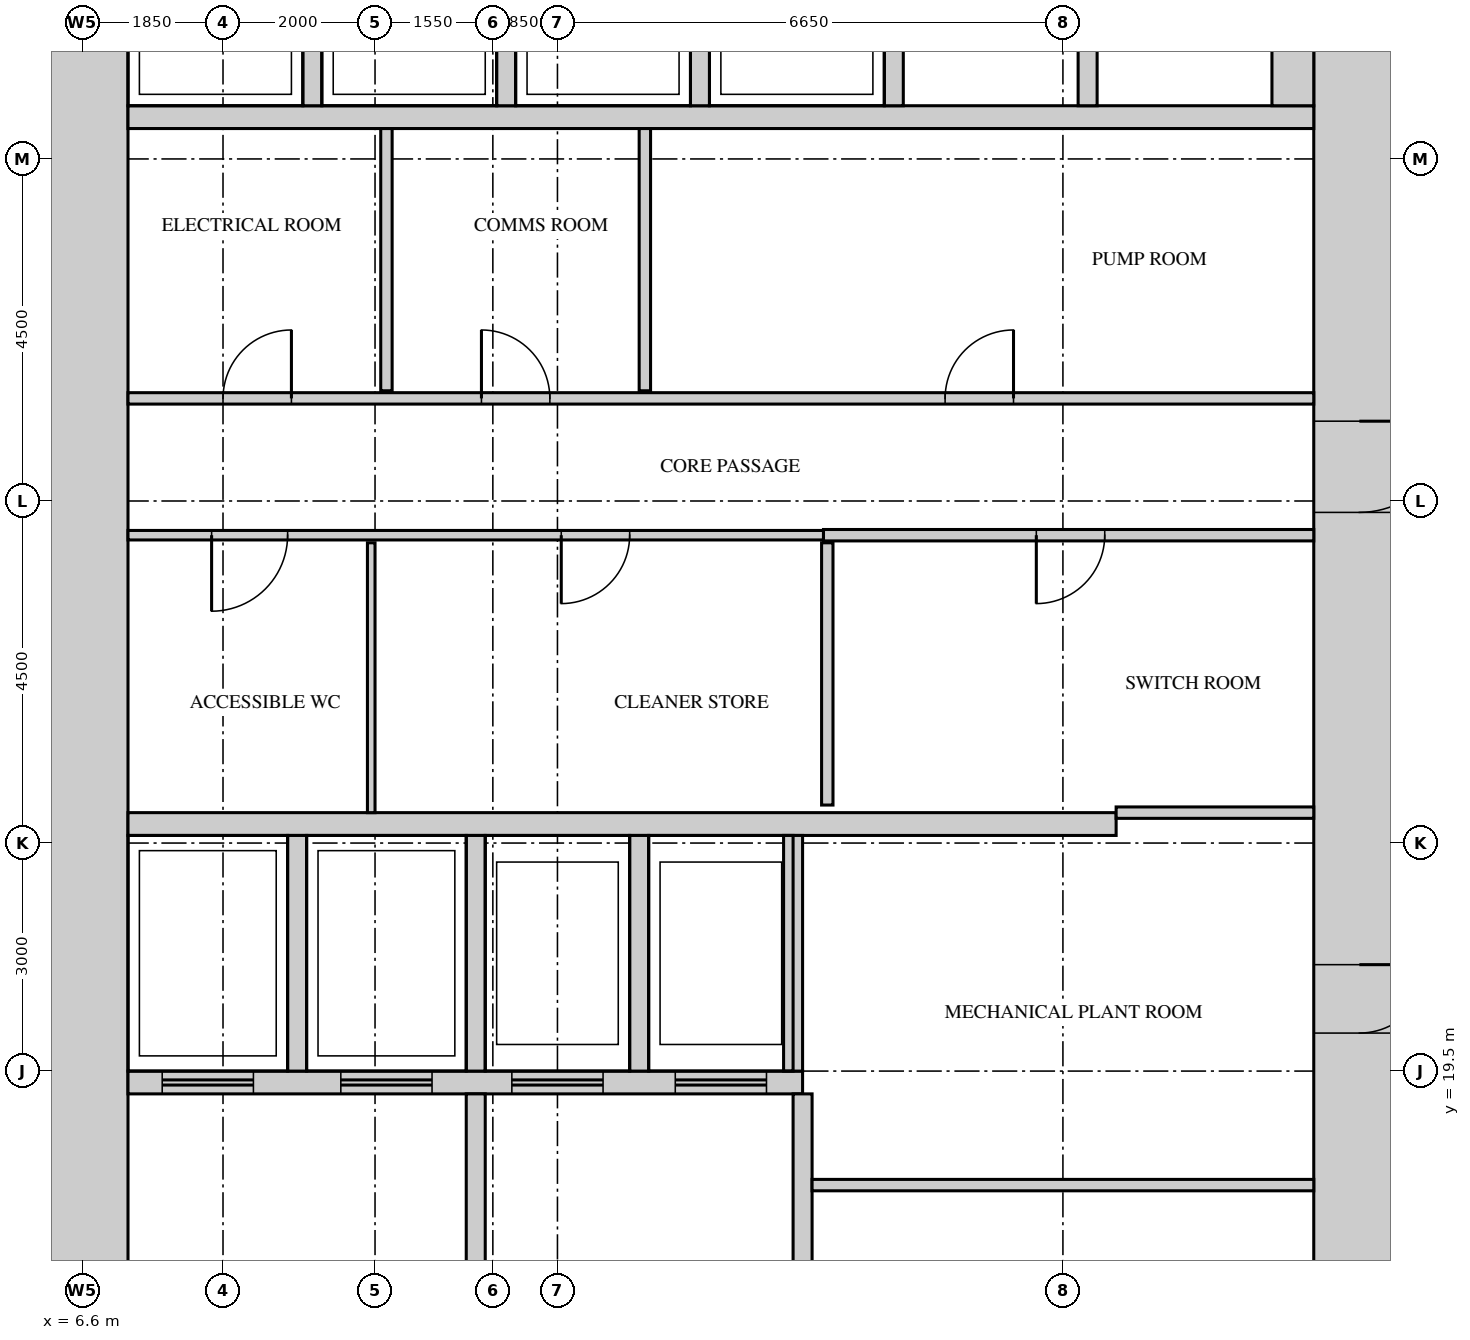
"""IFC4 building model, lengths in metres.
Left out: names, types, materials, properties, quantities, classifications, styles, units other than length and angle.
Written with IfcOpenShell. Run it as: python <this file> out.ifc"""

import sys

from ifc_helpers import new_model, si_unit, direction, frame, frame_2d, origin, place, context, subcontext, project, spatial, rectangle, extrude, source, transform, mapped, element, fill, save


model = new_model("IFC4")
c1 = context("Model", 3, precision=1e-05, world=origin(), true_north=direction((0.0, 1.0)))
c2 = subcontext(c1, "Body", "Model", "MODEL_VIEW")
j1 = project(units=[si_unit("LENGTHUNIT", "METRE"), si_unit("PLANEANGLEUNIT", "RADIAN")], contexts=[c1])
p1 = place(None, origin())
s1 = spatial("IfcSite", under=j1, at=p1, CompositionType="ELEMENT")
p2 = place(p1, origin())
s2 = spatial("IfcBuilding", under=s1, at=p2, CompositionType="ELEMENT")
p3 = place(p2, frame((0.0, 0.0, 37.5)))
s3 = spatial("IfcBuildingStorey", under=s2, at=p3, CompositionType="ELEMENT", Elevation=37.5)
m1 = source(origin(), c2, "Body", "SweptSolid", [
    extrude(rectangle(XDim=27.6, YDim=1.2, at=frame_2d((13.8, 0.0))), origin(), (0.0, 0.0, 1.0), 4.2),
])
p4 = place(p3, frame((23.4, 13.2, 0.0), z_axis=(0.0, 0.0, 1.0), x_axis=(0.0, 1.0, 0.0)))
e1 = element("IfcWall", 1, at=p4, inside=s3, PredefinedType="SHEAR", context=c2, shape_type="MappedRepresentation", body=[
    mapped(m1, transform((0.0, 0.0, 0.0))),
])
m2 = source(origin(), c2, "Body", "SweptSolid", [
    extrude(rectangle(XDim=1.8, YDim=2.1, at=frame_2d((0.9, 1.05))), frame((0.0, 0.61, 0.0), z_axis=(0.0, -1.0, 0.0), x_axis=(1.0, 0.0, 0.0)), (0.0, 0.0, 1.0), 1.22),
])
p5 = place(p4, frame((22.4, 0.0, 0.0)))
e2 = element("IfcOpeningElement", 2, at=p5, cuts=e1, PredefinedType="OPENING", context=c2, shape_type="MappedRepresentation", body=[
    mapped(m2, transform((0.0, 0.0, 0.0))),
])
m3 = source(origin(), c2, "Body", "SweptSolid", [
    extrude(rectangle(XDim=1.2, YDim=2.1, at=frame_2d((0.6, 1.05))), frame((0.0, 0.61, 0.0), z_axis=(0.0, -1.0, 0.0), x_axis=(1.0, 0.0, 0.0)), (0.0, 0.0, 1.0), 1.22),
])
p6 = place(p4, frame((13.65, 0.0, 0.0)))
e3 = element("IfcOpeningElement", 3, at=p6, cuts=e1, PredefinedType="OPENING", context=c2, shape_type="MappedRepresentation", body=[
    mapped(m3, transform((0.0, 0.0, 0.0))),
])
m4 = source(origin(), c2, "Body", "SweptSolid", [
    extrude(rectangle(XDim=0.9, YDim=2.1, at=frame_2d((0.45, 1.05))), frame((0.0, 0.61, 0.0), z_axis=(0.0, -1.0, 0.0), x_axis=(1.0, 0.0, 0.0)), (0.0, 0.0, 1.0), 1.22),
])
p7 = place(p4, frame((1.95, 0.0, 0.0)))
e4 = element("IfcOpeningElement", 4, at=p7, cuts=e1, PredefinedType="OPENING", context=c2, shape_type="MappedRepresentation", body=[
    mapped(m4, transform((0.0, 0.0, 0.0))),
])
p8 = place(p4, frame((6.8, 0.0, 0.0)))
e5 = element("IfcOpeningElement", 5, at=p8, cuts=e1, PredefinedType="OPENING", context=c2, shape_type="MappedRepresentation", body=[
    mapped(m4, transform((0.0, 0.0, 0.0))),
])
p9 = place(p3, frame((6.6, 13.2, 0.0), z_axis=(0.0, 0.0, 1.0), x_axis=(0.0, 1.0, 0.0)))
e6 = element("IfcWall", 6, at=p9, inside=s3, PredefinedType="SHEAR", context=c2, shape_type="MappedRepresentation", body=[
    mapped(m1, transform((0.0, 0.0, 0.0))),
])
m5 = source(origin(), c2, "Body", "SweptSolid", [
    extrude(rectangle(XDim=13.0, YDim=0.3, at=frame_2d((6.5, 0.0))), origin(), (0.0, 0.0, 1.0), 4.2),
])
p10 = place(p3, frame((7.2, 22.75, 0.0), z_axis=(0.0, 0.0, 1.0), x_axis=(1.0, 0.0, 0.0)))
e7 = element("IfcWall", 7, at=p10, inside=s3, PredefinedType="STANDARD", context=c2, shape_type="MappedRepresentation", body=[
    mapped(m5, transform((0.0, 0.0, 0.0))),
])
m6 = source(origin(), c2, "Body", "SweptSolid", [
    extrude(rectangle(XDim=8.875, YDim=0.3, at=frame_2d((4.438, 0.0))), origin(), (0.0, 0.0, 1.0), 4.2),
])
p11 = place(p3, frame((7.2, 19.35, 0.0), z_axis=(0.0, 0.0, 1.0), x_axis=(1.0, 0.0, 0.0)))
e8 = element("IfcWall", 8, at=p11, inside=s3, PredefinedType="STANDARD", context=c2, shape_type="MappedRepresentation", body=[
    mapped(m6, transform((0.0, 0.0, 0.0))),
])
m7 = source(origin(), c2, "Body", "SweptSolid", [
    extrude(rectangle(XDim=1.2, YDim=2.1, at=frame_2d((0.6, 1.05))), frame((0.0, 0.16, 0.0), z_axis=(0.0, -1.0, 0.0), x_axis=(1.0, 0.0, 0.0)), (0.0, 0.0, 1.0), 0.32),
])
p12 = place(p11, frame((0.45, 0.0, 0.0)))
e9 = element("IfcOpeningElement", 9, at=p12, cuts=e8, PredefinedType="OPENING", context=c2, shape_type="MappedRepresentation", body=[
    mapped(m7, transform((0.0, 0.0, 0.0))),
])
p13 = place(p11, frame((2.8, 0.0, 0.0)))
e10 = element("IfcOpeningElement", 10, at=p13, cuts=e8, PredefinedType="OPENING", context=c2, shape_type="MappedRepresentation", body=[
    mapped(m7, transform((0.0, 0.0, 0.0))),
])
p14 = place(p11, frame((5.05, 0.0, 0.0)))
e11 = element("IfcOpeningElement", 11, at=p14, cuts=e8, PredefinedType="OPENING", context=c2, shape_type="MappedRepresentation", body=[
    mapped(m7, transform((0.0, 0.0, 0.0))),
])
p15 = place(p11, frame((7.2, 0.0, 0.0)))
e12 = element("IfcOpeningElement", 12, at=p15, cuts=e8, PredefinedType="OPENING", context=c2, shape_type="MappedRepresentation", body=[
    mapped(m7, transform((0.0, 0.0, 0.0))),
])
m8 = source(origin(), c2, "Body", "SweptSolid", [
    extrude(rectangle(XDim=15.6, YDim=0.3, at=frame_2d((7.8, 0.0))), origin(), (0.0, 0.0, 1.0), 4.2),
])
p16 = place(p3, frame((7.2, 32.05, 0.0), z_axis=(0.0, 0.0, 1.0), x_axis=(1.0, 0.0, 0.0)))
e13 = element("IfcWall", 13, at=p16, inside=s3, PredefinedType="STANDARD", context=c2, shape_type="MappedRepresentation", body=[
    mapped(m8, transform((0.0, 0.0, 0.0))),
])
m9 = source(origin(), c2, "Body", "SweptSolid", [
    extrude(rectangle(XDim=3.1, YDim=0.25, at=frame_2d((1.55, 0.0))), origin(), (0.0, 0.0, 1.0), 4.2),
])
for number, where, z_axis, x_axis in (
    (14, (9.425, 19.5, 0.0), (0.0, 0.0, 1.0), (0.0, 1.0, 0.0)),
    (15, (11.775, 19.5, 0.0), (0.0, 0.0, 1.0), (0.0, 1.0, 0.0)),
    (16, (13.925, 19.5, 0.0), (0.0, 0.0, 1.0), (0.0, 1.0, 0.0)),
    (17, (15.95, 19.5, 0.0), (0.0, 0.0, 1.0), (0.0, 1.0, 0.0)),
):
    element("IfcWall", number, at=place(p3, frame(where, z_axis=z_axis, x_axis=x_axis)), inside=s3, PredefinedType="STANDARD", context=c2, shape_type="MappedRepresentation", body=[
        mapped(m9, transform((0.0, 0.0, 0.0))),
    ])
m10 = source(origin(), c2, "Body", "SweptSolid", [
    extrude(rectangle(XDim=2.4, YDim=0.25, at=frame_2d((1.2, 0.0))), origin(), (0.0, 0.0, 1.0), 4.2),
])
for number, where, z_axis, x_axis in (
    (18, (9.625, 32.2, 0.0), (0.0, 0.0, 1.0), (0.0, 1.0, 0.0)),
    (19, (12.175, 32.2, 0.0), (0.0, 0.0, 1.0), (0.0, 1.0, 0.0)),
    (20, (14.725, 32.2, 0.0), (0.0, 0.0, 1.0), (0.0, 1.0, 0.0)),
    (21, (17.275, 32.2, 0.0), (0.0, 0.0, 1.0), (0.0, 1.0, 0.0)),
    (22, (19.825, 32.2, 0.0), (0.0, 0.0, 1.0), (0.0, 1.0, 0.0)),
):
    element("IfcWall", number, at=place(p3, frame(where, z_axis=z_axis, x_axis=x_axis)), inside=s3, PredefinedType="STANDARD", context=c2, shape_type="MappedRepresentation", body=[
        mapped(m10, transform((0.0, 0.0, 0.0))),
    ])
m11 = source(origin(), c2, "Body", "SweptSolid", [
    extrude(rectangle(XDim=2.4, YDim=0.55, at=frame_2d((1.2, 0.0))), origin(), (0.0, 0.0, 1.0), 4.2),
])
p17 = place(p3, frame((22.525, 32.2, 0.0), z_axis=(0.0, 0.0, 1.0), x_axis=(0.0, 1.0, 0.0)))
e23 = element("IfcWall", 23, at=p17, inside=s3, PredefinedType="STANDARD", context=c2, shape_type="MappedRepresentation", body=[
    mapped(m11, transform((0.0, 0.0, 0.0))),
])
m12 = source(origin(), c2, "Body", "SweptSolid", [
    extrude(rectangle(XDim=3.4, YDim=0.25, at=frame_2d((1.7, 0.0))), origin(), (0.0, 0.0, 1.0), 4.2),
])
for number, where, z_axis, x_axis in (
    (24, (16.075, 15.8, 0.0), (0.0, 0.0, 1.0), (0.0, 1.0, 0.0)),
    (25, (11.775, 15.8, 0.0), (0.0, 0.0, 1.0), (0.0, 1.0, 0.0)),
):
    element("IfcWall", number, at=place(p3, frame(where, z_axis=z_axis, x_axis=x_axis)), inside=s3, PredefinedType="STANDARD", context=c2, shape_type="MappedRepresentation", body=[
        mapped(m12, transform((0.0, 0.0, 0.0))),
    ])
m13 = source(origin(), c2, "Body", "SweptSolid", [
    extrude(rectangle(XDim=6.6, YDim=0.15, at=frame_2d((3.3, 0.0))), origin(), (0.0, 0.0, 1.0), 4.3),
])
p18 = place(p3, frame((16.2, 18.0, 0.0), z_axis=(0.0, 0.0, 1.0), x_axis=(1.0, 0.0, 0.0)))
e26 = element("IfcWall", 26, at=p18, inside=s3, PredefinedType="PARTITIONING", context=c2, shape_type="MappedRepresentation", body=[
    mapped(m13, transform((0.0, 0.0, 0.0))),
])
m14 = source(origin(), c2, "Body", "SweptSolid", [
    extrude(rectangle(XDim=3.55, YDim=0.1, at=frame_2d((1.775, 0.0))), origin(), (0.0, 0.0, 1.0), 4.3),
])
p19 = place(p3, frame((10.4, 22.9, 0.0), z_axis=(0.0, 0.0, 1.0), x_axis=(0.0, 1.0, 0.0)))
e27 = element("IfcWall", 27, at=p19, inside=s3, PredefinedType="PARTITIONING", context=c2, shape_type="MappedRepresentation", body=[
    mapped(m14, transform((0.0, 0.0, 0.0))),
])
m15 = source(origin(), c2, "Body", "SweptSolid", [
    extrude(rectangle(XDim=2.6, YDim=0.15, at=frame_2d((1.3, 0.0))), origin(), (0.0, 0.0, 1.0), 4.3),
])
p20 = place(p3, frame((20.2, 22.9, 0.0), z_axis=(0.0, 0.0, 1.0), x_axis=(1.0, 0.0, 0.0)))
e28 = element("IfcWall", 28, at=p20, inside=s3, PredefinedType="PARTITIONING", context=c2, shape_type="MappedRepresentation", body=[
    mapped(m15, transform((0.0, 0.0, 0.0))),
])
m16 = source(origin(), c2, "Body", "SweptSolid", [
    extrude(rectangle(XDim=3.45, YDim=0.15, at=frame_2d((1.725, 0.0))), origin(), (0.0, 0.0, 1.0), 4.3),
])
p21 = place(p3, frame((16.4, 23.0, 0.0), z_axis=(0.0, 0.0, 1.0), x_axis=(0.0, 1.0, 0.0)))
e29 = element("IfcWall", 29, at=p21, inside=s3, PredefinedType="PARTITIONING", context=c2, shape_type="MappedRepresentation", body=[
    mapped(m16, transform((0.0, 0.0, 0.0))),
])
m17 = source(origin(), c2, "Body", "SweptSolid", [
    extrude(rectangle(XDim=9.15, YDim=0.125, at=frame_2d((4.575, 0.0))), origin(), (0.0, 0.0, 1.0), 4.3),
])
p22 = place(p3, frame((7.2, 26.55, 0.0), z_axis=(0.0, 0.0, 1.0), x_axis=(1.0, 0.0, 0.0)))
e30 = element("IfcWall", 30, at=p22, inside=s3, PredefinedType="PARTITIONING", context=c2, shape_type="MappedRepresentation", body=[
    mapped(m17, transform((0.0, 0.0, 0.0))),
])
m18 = source(origin(), c2, "Body", "SweptSolid", [
    extrude(rectangle(XDim=1.0, YDim=2.1, at=frame_2d((0.5, 1.05))), frame((0.0, 0.073, 0.0), z_axis=(0.0, -1.0, 0.0), x_axis=(1.0, 0.0, 0.0)), (0.0, 0.0, 1.0), 0.145),
])
p23 = place(p22, frame((1.1, 0.0, 0.0)))
e31 = element("IfcOpeningElement", 31, at=p23, cuts=e30, PredefinedType="OPENING", context=c2, shape_type="MappedRepresentation", body=[
    mapped(m18, transform((0.0, 0.0, 0.0))),
])
m19 = source(origin(), c2, "Body", "SweptSolid", [
    extrude(rectangle(XDim=0.9, YDim=2.1, at=frame_2d((0.45, 1.05))), frame((0.0, 0.073, 0.0), z_axis=(0.0, -1.0, 0.0), x_axis=(1.0, 0.0, 0.0)), (0.0, 0.0, 1.0), 0.145),
])
p24 = place(p22, frame((5.7, 0.0, 0.0)))
e32 = element("IfcOpeningElement", 32, at=p24, cuts=e30, PredefinedType="OPENING", context=c2, shape_type="MappedRepresentation", body=[
    mapped(m19, transform((0.0, 0.0, 0.0))),
])
m20 = source(origin(), c2, "Body", "SweptSolid", [
    extrude(rectangle(XDim=6.45, YDim=0.15, at=frame_2d((3.225, 0.0))), origin(), (0.0, 0.0, 1.0), 4.3),
])
p25 = place(p3, frame((16.35, 26.55, 0.0), z_axis=(0.0, 0.0, 1.0), x_axis=(1.0, 0.0, 0.0)))
e33 = element("IfcWall", 33, at=p25, inside=s3, PredefinedType="PARTITIONING", context=c2, shape_type="MappedRepresentation", body=[
    mapped(m20, transform((0.0, 0.0, 0.0))),
])
m21 = source(origin(), c2, "Body", "SweptSolid", [
    extrude(rectangle(XDim=0.9, YDim=2.1, at=frame_2d((0.45, 1.05))), frame((0.0, 0.085, 0.0), z_axis=(0.0, -1.0, 0.0), x_axis=(1.0, 0.0, 0.0)), (0.0, 0.0, 1.0), 0.17),
])
p26 = place(p25, frame((2.8, 0.0, 0.0)))
e34 = element("IfcOpeningElement", 34, at=p26, cuts=e33, PredefinedType="OPENING", context=c2, shape_type="MappedRepresentation", body=[
    mapped(m21, transform((0.0, 0.0, 0.0))),
])
m22 = source(origin(), c2, "Body", "SweptSolid", [
    extrude(rectangle(XDim=15.6, YDim=0.15, at=frame_2d((7.8, 0.0))), origin(), (0.0, 0.0, 1.0), 4.3),
])
p27 = place(p3, frame((7.2, 28.35, 0.0), z_axis=(0.0, 0.0, 1.0), x_axis=(1.0, 0.0, 0.0)))
e35 = element("IfcWall", 35, at=p27, inside=s3, PredefinedType="PARTITIONING", context=c2, shape_type="MappedRepresentation", body=[
    mapped(m22, transform((0.0, 0.0, 0.0))),
])
p28 = place(p27, frame((1.25, 0.0, 0.0)))
e36 = element("IfcOpeningElement", 36, at=p28, cuts=e35, PredefinedType="OPENING", context=c2, shape_type="MappedRepresentation", body=[
    mapped(m21, transform((0.0, 0.0, 0.0))),
])
p29 = place(p27, frame((4.65, 0.0, 0.0)))
e37 = element("IfcOpeningElement", 37, at=p29, cuts=e35, PredefinedType="OPENING", context=c2, shape_type="MappedRepresentation", body=[
    mapped(m21, transform((0.0, 0.0, 0.0))),
])
p30 = place(p27, frame((10.75, 0.0, 0.0)))
e38 = element("IfcOpeningElement", 38, at=p30, cuts=e35, PredefinedType="OPENING", context=c2, shape_type="MappedRepresentation", body=[
    mapped(m21, transform((0.0, 0.0, 0.0))),
])
for number, where, z_axis, x_axis in (
    (39, (10.6, 28.45, 0.0), (0.0, 0.0, 1.0), (0.0, 1.0, 0.0)),
    (40, (14.0, 28.45, 0.0), (0.0, 0.0, 1.0), (0.0, 1.0, 0.0)),
):
    element("IfcWall", number, at=place(p3, frame(where, z_axis=z_axis, x_axis=x_axis)), inside=s3, PredefinedType="PARTITIONING", context=c2, shape_type="MappedRepresentation", body=[
        mapped(m16, transform((0.0, 0.0, 0.0))),
    ])
m23 = source(origin(), c2, "Body", "SweptSolid", [
    extrude(rectangle(XDim=1.2, YDim=2.1, at=frame_2d((0.6, 1.05))), frame((0.0, 0.55, 0.0), z_axis=(0.0, -1.0, 0.0), x_axis=(1.0, 0.0, 0.0)), (0.0, 0.0, 1.0), 1.1),
])
p31 = place(p6, origin())
e41 = element("IfcDoor", 41, at=p31, inside=s3, OperationType="SINGLE_SWING_RIGHT", PredefinedType="DOOR", context=c2, shape_type="MappedRepresentation", body=[
    mapped(m23, transform((0.0, 0.0, 0.0))),
])
fill(e3, e41)
m24 = source(origin(), c2, "Body", "SweptSolid", [
    extrude(rectangle(XDim=0.9, YDim=2.1, at=frame_2d((0.45, 1.05))), frame((0.0, 0.025, 0.0), z_axis=(0.0, -1.0, 0.0), x_axis=(1.0, 0.0, 0.0)), (0.0, 0.0, 1.0), 0.05),
])
p32 = place(p28, origin())
e42 = element("IfcDoor", 42, at=p32, inside=s3, OperationType="SINGLE_SWING_LEFT", PredefinedType="DOOR", context=c2, shape_type="MappedRepresentation", body=[
    mapped(m24, transform((0.0, 0.0, 0.0))),
])
fill(e36, e42)
p33 = place(p29, origin())
e43 = element("IfcDoor", 43, at=p33, inside=s3, OperationType="SINGLE_SWING_RIGHT", PredefinedType="DOOR", context=c2, shape_type="MappedRepresentation", body=[
    mapped(m24, transform((0.0, 0.0, 0.0))),
])
fill(e37, e43)
p34 = place(p30, origin())
e44 = element("IfcDoor", 44, at=p34, inside=s3, OperationType="SINGLE_SWING_LEFT", PredefinedType="DOOR", context=c2, shape_type="MappedRepresentation", body=[
    mapped(m24, transform((0.0, 0.0, 0.0))),
])
fill(e38, e44)
m25 = source(origin(), c2, "Body", "SweptSolid", [
    extrude(rectangle(XDim=1.0, YDim=2.1, at=frame_2d((0.5, 1.05))), frame((0.0, 0.025, 0.0), z_axis=(0.0, -1.0, 0.0), x_axis=(1.0, 0.0, 0.0)), (0.0, 0.0, 1.0), 0.05),
])
p35 = place(p23, origin())
e45 = element("IfcDoor", 45, at=p35, inside=s3, OperationType="SINGLE_SWING_LEFT", PredefinedType="DOOR", context=c2, shape_type="MappedRepresentation", body=[
    mapped(m25, transform((0.0, 0.0, 0.0))),
])
fill(e31, e45)
p36 = place(p24, origin())
e46 = element("IfcDoor", 46, at=p36, inside=s3, OperationType="SINGLE_SWING_LEFT", PredefinedType="DOOR", context=c2, shape_type="MappedRepresentation", body=[
    mapped(m24, transform((0.0, 0.0, 0.0))),
])
fill(e32, e46)
p37 = place(p26, origin())
e47 = element("IfcDoor", 47, at=p37, inside=s3, OperationType="SINGLE_SWING_LEFT", PredefinedType="DOOR", context=c2, shape_type="MappedRepresentation", body=[
    mapped(m24, transform((0.0, 0.0, 0.0))),
])
fill(e34, e47)
m26 = source(origin(), c2, "Body", "SweptSolid", [
    extrude(rectangle(XDim=0.9, YDim=2.1, at=frame_2d((0.45, 1.05))), frame((0.0, 0.55, 0.0), z_axis=(0.0, -1.0, 0.0), x_axis=(1.0, 0.0, 0.0)), (0.0, 0.0, 1.0), 1.1),
])
p38 = place(p8, origin())
e48 = element("IfcDoor", 48, at=p38, inside=s3, OperationType="SINGLE_SWING_RIGHT", PredefinedType="DOOR", context=c2, shape_type="MappedRepresentation", body=[
    mapped(m26, transform((0.0, 0.0, 0.0))),
])
fill(e5, e48)
m27 = source(origin(), c2, "Body", "SweptSolid", [
    extrude(rectangle(XDim=1.2, YDim=2.1, at=frame_2d((0.6, 1.05))), frame((0.0, 0.025, 0.0), z_axis=(0.0, -1.0, 0.0), x_axis=(1.0, 0.0, 0.0)), (0.0, 0.0, 1.0), 0.05),
])
p39 = place(p12, origin())
e49 = element("IfcDoor", 49, at=p39, inside=s3, OperationType="DOUBLE_DOOR_SLIDING", PredefinedType="DOOR", context=c2, shape_type="MappedRepresentation", body=[
    mapped(m27, transform((0.0, 0.0, 0.0))),
])
fill(e9, e49)
p40 = place(p13, origin())
e50 = element("IfcDoor", 50, at=p40, inside=s3, OperationType="DOUBLE_DOOR_SLIDING", PredefinedType="DOOR", context=c2, shape_type="MappedRepresentation", body=[
    mapped(m27, transform((0.0, 0.0, 0.0))),
])
fill(e10, e50)
p41 = place(p14, origin())
e51 = element("IfcDoor", 51, at=p41, inside=s3, OperationType="DOUBLE_DOOR_SLIDING", PredefinedType="DOOR", context=c2, shape_type="MappedRepresentation", body=[
    mapped(m27, transform((0.0, 0.0, 0.0))),
])
fill(e11, e51)
p42 = place(p15, origin())
e52 = element("IfcDoor", 52, at=p42, inside=s3, OperationType="DOUBLE_DOOR_SLIDING", PredefinedType="DOOR", context=c2, shape_type="MappedRepresentation", body=[
    mapped(m27, transform((0.0, 0.0, 0.0))),
])
fill(e12, e52)
save(model, sys.argv[1])
